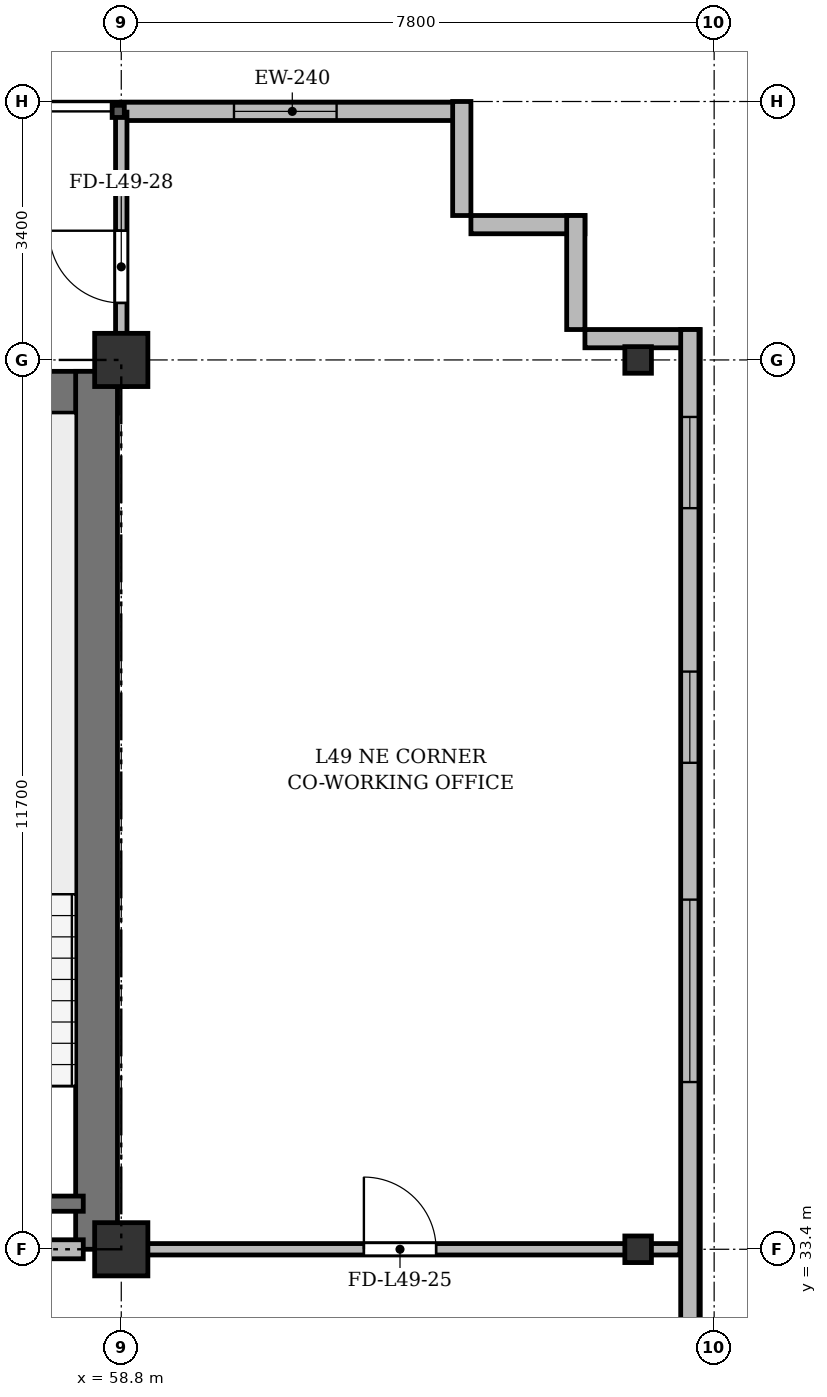
"""IFC4 building model, lengths in metres.
Left out: names, types, materials, properties, quantities, classifications, styles, units other than length and angle.
Written with IfcOpenShell. Run it as: python <this file> out.ifc"""

import sys

from ifc_helpers import new_model, si_unit, direction, frame, frame_2d, origin, origin_2d, place, context, subcontext, project, spatial, rectangle, i_section, extrude, source, transform, mapped, element, fill, save


model = new_model("IFC4")
c1 = context("Model", 3, precision=1e-05, world=origin(), true_north=direction((0.0, 1.0)))
c2 = subcontext(c1, "Body", "Model", "MODEL_VIEW")
j1 = project(units=[si_unit("LENGTHUNIT", "METRE"), si_unit("PLANEANGLEUNIT", "RADIAN")], contexts=[c1])
p1 = place(None, origin())
s1 = spatial("IfcSite", under=j1, at=p1, CompositionType="ELEMENT")
p2 = place(p1, origin())
s2 = spatial("IfcBuilding", under=s1, at=p2, CompositionType="ELEMENT")
p3 = place(p2, frame((0.0, 0.0, 190.5)))
s3 = spatial("IfcBuildingStorey", under=s2, at=p3, CompositionType="ELEMENT", Elevation=190.5)
m1 = source(origin(), c2, "Body", "SweptSolid", [
    extrude(rectangle(XDim=0.7, YDim=0.7, at=origin_2d()), origin(), (0.0, 0.0, 1.0), 3.6),
])
for number, where, z_axis, x_axis in (
    (1, (58.8, 33.4, 0.0), (0.0, 0.0, 1.0), (1.0, 0.0, 0.0)),
    (2, (58.8, 45.1, 0.0), (0.0, 0.0, 1.0), (1.0, 0.0, 0.0)),
):
    element("IfcColumn", number, at=place(p3, frame(where, z_axis=z_axis, x_axis=x_axis)), inside=s3, PredefinedType="COLUMN", context=c2, shape_type="MappedRepresentation", body=[
        mapped(m1, transform((0.0, 0.0, 0.0), x_axis=(1.0, 0.0, 0.0), y_axis=(0.0, 1.0, 0.0), z_axis=(0.0, 0.0, 1.0), scale=1.0)),
    ])
m2 = source(origin(), c2, "Body", "SweptSolid", [
    extrude(i_section(OverallWidth=0.35, OverallDepth=0.35, WebThickness=0.018, FlangeThickness=0.028, at=origin_2d()), origin(), (0.0, 0.0, 1.0), 3.6),
])
for number, where, z_axis, x_axis in (
    (3, (65.6, 33.4, 0.0), (0.0, 0.0, 1.0), (1.0, 0.0, 0.0)),
    (4, (65.6, 45.1, 0.0), (0.0, 0.0, 1.0), (1.0, 0.0, 0.0)),
):
    element("IfcColumn", number, at=place(p3, frame(where, z_axis=z_axis, x_axis=x_axis)), inside=s3, PredefinedType="COLUMN", context=c2, shape_type="MappedRepresentation", body=[
        mapped(m2, transform((0.0, 0.0, 0.0), x_axis=(1.0, 0.0, 0.0), y_axis=(0.0, 1.0, 0.0), z_axis=(0.0, 0.0, 1.0), scale=1.0)),
    ])
p4 = place(p3, frame((58.8, 48.37, 0.0), z_axis=(0.0, 0.0, 1.0), x_axis=(1.0, 0.0, 0.0)))
e5 = element("IfcWall", 5, at=p4, inside=s3, PredefinedType="SOLIDWALL", context=c2, shape_type="SweptSolid", body=[
    extrude(rectangle(XDim=4.5, YDim=0.24, at=frame_2d((2.25, 0.0))), origin(), (0.0, 0.0, 1.0), 3.36),
])
p5 = place(p4, frame((1.483, 0.0, 0.9)))
e6 = element("IfcOpeningElement", 6, at=p5, cuts=e5, PredefinedType="OPENING", context=c2, shape_type="SweptSolid", body=[
    extrude(rectangle(XDim=1.35, YDim=1.5, at=frame_2d((0.675, 0.75))), frame((0.0, 0.13, 0.0), z_axis=(0.0, -1.0, 0.0), x_axis=(1.0, 0.0, 0.0)), (0.0, 0.0, 1.0), 0.26),
])
for number, where, z_axis, x_axis in (
    (7, (63.28, 48.5, 0.0), (0.0, 0.0, 1.0), (0.0, -1.0, 0.0)),
    (8, (63.4, 46.88, 0.0), (0.0, 0.0, 1.0), (1.0, 0.0, 0.0)),
    (9, (64.78, 47.0, 0.0), (0.0, 0.0, 1.0), (0.0, -1.0, 0.0)),
    (10, (64.9, 45.38, 0.0), (0.0, 0.0, 1.0), (1.0, 0.0, 0.0)),
):
    element("IfcWall", number, at=place(p3, frame(where, z_axis=z_axis, x_axis=x_axis)), inside=s3, PredefinedType="SOLIDWALL", context=c2, shape_type="SweptSolid", body=[
        extrude(rectangle(XDim=1.5, YDim=0.24, at=frame_2d((0.75, 0.0))), origin(), (0.0, 0.0, 1.0), 3.36),
    ])
p6 = place(p3, frame((66.28, 45.5, 0.0), z_axis=(0.0, 0.0, 1.0), x_axis=(0.0, -1.0, 0.0)))
e11 = element("IfcWall", 11, at=p6, inside=s3, PredefinedType="SOLIDWALL", context=c2, shape_type="SweptSolid", body=[
    extrude(rectangle(XDim=39.1, YDim=0.24, at=frame_2d((19.55, 0.0))), origin(), (0.0, 0.0, 1.0), 3.36),
])
p7 = place(p6, frame((36.45, 0.0, 0.92)))
e12 = element("IfcOpeningElement", 12, at=p7, cuts=e11, PredefinedType="OPENING", context=c2, shape_type="SweptSolid", body=[
    extrude(rectangle(XDim=1.2, YDim=1.65, at=frame_2d((0.6, 0.825))), frame((0.0, 0.13, 0.0), z_axis=(0.0, -1.0, 0.0), x_axis=(1.0, 0.0, 0.0)), (0.0, 0.0, 1.0), 0.26),
])
p8 = place(p6, frame((32.9, 0.0, 0.92)))
e13 = element("IfcOpeningElement", 13, at=p8, cuts=e11, PredefinedType="OPENING", context=c2, shape_type="SweptSolid", body=[
    extrude(rectangle(XDim=2.4, YDim=2.1, at=frame_2d((1.2, 1.05))), frame((0.0, 0.13, 0.0), z_axis=(0.0, -1.0, 0.0), x_axis=(1.0, 0.0, 0.0)), (0.0, 0.0, 1.0), 0.26),
])
p9 = place(p6, frame((28.7, 0.0, 0.92)))
e14 = element("IfcOpeningElement", 14, at=p9, cuts=e11, PredefinedType="OPENING", context=c2, shape_type="SweptSolid", body=[
    extrude(rectangle(XDim=2.4, YDim=2.1, at=frame_2d((1.2, 1.05))), frame((0.0, 0.13, 0.0), z_axis=(0.0, -1.0, 0.0), x_axis=(1.0, 0.0, 0.0)), (0.0, 0.0, 1.0), 0.26),
])
p10 = place(p6, frame((21.5, 0.0, 0.92)))
e15 = element("IfcOpeningElement", 15, at=p10, cuts=e11, PredefinedType="OPENING", context=c2, shape_type="SweptSolid", body=[
    extrude(rectangle(XDim=2.4, YDim=2.1, at=frame_2d((1.2, 1.05))), frame((0.0, 0.13, 0.0), z_axis=(0.0, -1.0, 0.0), x_axis=(1.0, 0.0, 0.0)), (0.0, 0.0, 1.0), 0.26),
])
p11 = place(p6, frame((7.5, 0.0, 0.92)))
e16 = element("IfcOpeningElement", 16, at=p11, cuts=e11, PredefinedType="OPENING", context=c2, shape_type="SweptSolid", body=[
    extrude(rectangle(XDim=2.4, YDim=2.1, at=frame_2d((1.2, 1.05))), frame((0.0, 0.13, 0.0), z_axis=(0.0, -1.0, 0.0), x_axis=(1.0, 0.0, 0.0)), (0.0, 0.0, 1.0), 0.26),
])
p12 = place(p6, frame((4.5, 0.0, 0.92)))
e17 = element("IfcOpeningElement", 17, at=p12, cuts=e11, PredefinedType="OPENING", context=c2, shape_type="SweptSolid", body=[
    extrude(rectangle(XDim=1.2, YDim=1.65, at=frame_2d((0.6, 0.825))), frame((0.0, 0.13, 0.0), z_axis=(0.0, -1.0, 0.0), x_axis=(1.0, 0.0, 0.0)), (0.0, 0.0, 1.0), 0.26),
])
p13 = place(p6, frame((1.15, 0.0, 0.92)))
e18 = element("IfcOpeningElement", 18, at=p13, cuts=e11, PredefinedType="OPENING", context=c2, shape_type="SweptSolid", body=[
    extrude(rectangle(XDim=1.2, YDim=1.65, at=frame_2d((0.6, 0.825))), frame((0.0, 0.13, 0.0), z_axis=(0.0, -1.0, 0.0), x_axis=(1.0, 0.0, 0.0)), (0.0, 0.0, 1.0), 0.26),
])
p14 = place(p3, frame((15.65, 44.675, 0.0), z_axis=(0.0, 0.0, 1.0), x_axis=(1.0, 0.0, 0.0)))
e19 = element("IfcWall", 19, at=p14, inside=s3, PredefinedType="SHEAR", context=c2, shape_type="SweptSolid", body=[
    extrude(rectangle(XDim=43.1, YDim=0.55, at=frame_2d((21.55, 0.0))), origin(), (0.0, 0.0, 1.0), 3.36),
])
p15 = place(p3, frame((58.475, 33.4, 0.0), z_axis=(0.0, 0.0, 1.0), x_axis=(0.0, 1.0, 0.0)))
e20 = element("IfcWall", 20, at=p15, inside=s3, PredefinedType="SHEAR", context=c2, shape_type="SweptSolid", body=[
    extrude(rectangle(XDim=11.55, YDim=0.55, at=frame_2d((5.775, 0.0))), origin(), (0.0, 0.0, 1.0), 3.36),
])
p16 = place(p3, frame((54.9, 34.0, 0.0), z_axis=(0.0, 0.0, 1.0), x_axis=(1.0, 0.0, 0.0)))
e21 = element("IfcWall", 21, at=p16, inside=s3, PredefinedType="SHEAR", context=c2, shape_type="SweptSolid", body=[
    extrude(rectangle(XDim=3.4, YDim=0.2, at=frame_2d((1.7, 0.0))), origin(), (0.0, 0.0, 1.0), 3.36),
])
p17 = place(p3, frame((47.15, 33.4, 0.0), z_axis=(0.0, 0.0, 1.0), x_axis=(1.0, 0.0, 0.0)))
e22 = element("IfcWall", 22, at=p17, inside=s3, PredefinedType="PARTITIONING", context=c2, shape_type="SweptSolid", body=[
    extrude(rectangle(XDim=11.15, YDim=0.25, at=frame_2d((5.575, 0.0))), origin(), (0.0, 0.0, 1.0), 2.91),
])
p18 = place(p17, frame((0.7, 0.0, 0.0)))
e23 = element("IfcOpeningElement", 23, at=p18, cuts=e22, PredefinedType="OPENING", context=c2, shape_type="SweptSolid", body=[
    extrude(rectangle(XDim=0.95, YDim=2.15, at=frame_2d((0.475, 1.075))), frame((0.0, 0.135, 0.0), z_axis=(0.0, -1.0, 0.0), x_axis=(1.0, 0.0, 0.0)), (0.0, 0.0, 1.0), 0.27),
])
p19 = place(p17, frame((6.0, 0.0, 0.0)))
e24 = element("IfcOpeningElement", 24, at=p19, cuts=e22, PredefinedType="OPENING", context=c2, shape_type="SweptSolid", body=[
    extrude(rectangle(XDim=1.2, YDim=2.15, at=frame_2d((0.6, 1.075))), frame((0.0, 0.135, 0.0), z_axis=(0.0, -1.0, 0.0), x_axis=(1.0, 0.0, 0.0)), (0.0, 0.0, 1.0), 0.27),
])
p20 = place(p3, frame((58.8, 33.4, 0.0), z_axis=(0.0, 0.0, 1.0), x_axis=(1.0, 0.0, 0.0)))
e25 = element("IfcWall", 25, at=p20, inside=s3, PredefinedType="PARTITIONING", context=c2, shape_type="SweptSolid", body=[
    extrude(rectangle(XDim=7.35, YDim=0.15, at=frame_2d((3.675, 0.0))), origin(), (0.0, 0.0, 1.0), 2.91),
])
p21 = place(p20, frame((3.192, 0.0, 0.0)))
e26 = element("IfcOpeningElement", 26, at=p21, cuts=e25, PredefinedType="OPENING", context=c2, shape_type="SweptSolid", body=[
    extrude(rectangle(XDim=0.95, YDim=2.15, at=frame_2d((0.475, 1.075))), frame((0.0, 0.085, 0.0), z_axis=(0.0, -1.0, 0.0), x_axis=(1.0, 0.0, 0.0)), (0.0, 0.0, 1.0), 0.17),
])
p22 = place(p3, frame((58.8, 44.75, 0.0), z_axis=(0.0, 0.0, 1.0), x_axis=(0.0, 1.0, 0.0)))
e27 = element("IfcWall", 27, at=p22, inside=s3, PredefinedType="PARTITIONING", context=c2, shape_type="SweptSolid", body=[
    extrude(rectangle(XDim=3.61, YDim=0.15, at=frame_2d((1.805, 0.0))), origin(), (0.0, 0.0, 1.0), 2.86),
])
p23 = place(p22, frame((1.1, 0.0, 0.0)))
e28 = element("IfcOpeningElement", 28, at=p23, cuts=e27, PredefinedType="OPENING", context=c2, shape_type="SweptSolid", body=[
    extrude(rectangle(XDim=0.95, YDim=2.15, at=frame_2d((0.475, 1.075))), frame((0.0, 0.085, 0.0), z_axis=(0.0, -1.0, 0.0), x_axis=(1.0, 0.0, 0.0)), (0.0, 0.0, 1.0), 0.17),
])
m3 = source(origin(), c2, "Body", "SweptSolid", [
    extrude(rectangle(XDim=1.35, YDim=1.5, at=frame_2d((0.675, 0.75))), frame((0.0, 0.03, 0.0), z_axis=(0.0, -1.0, 0.0), x_axis=(1.0, 0.0, 0.0)), (0.0, 0.0, 1.0), 0.06),
])
p24 = place(p5, origin())
e29 = element("IfcWindow", 29, at=p24, inside=s3, PartitioningType="SINGLE_PANEL", PredefinedType="WINDOW", context=c2, shape_type="MappedRepresentation", body=[
    mapped(m3, transform((0.0, 0.0, 0.0), x_axis=(1.0, 0.0, 0.0), y_axis=(0.0, 1.0, 0.0), z_axis=(0.0, 0.0, 1.0), scale=1.0)),
])
fill(e6, e29)
m4 = source(origin(), c2, "Body", "SweptSolid", [
    extrude(rectangle(XDim=2.4, YDim=2.1, at=frame_2d((1.2, 1.05))), frame((0.0, 0.03, 0.0), z_axis=(0.0, -1.0, 0.0), x_axis=(1.0, 0.0, 0.0)), (0.0, 0.0, 1.0), 0.06),
])
p25 = place(p11, origin())
e30 = element("IfcWindow", 30, at=p25, inside=s3, PartitioningType="SINGLE_PANEL", PredefinedType="WINDOW", context=c2, shape_type="MappedRepresentation", body=[
    mapped(m4, transform((0.0, 0.0, 0.0), x_axis=(1.0, 0.0, 0.0), y_axis=(0.0, 1.0, 0.0), z_axis=(0.0, 0.0, 1.0), scale=1.0)),
])
fill(e16, e30)
m5 = source(origin(), c2, "Body", "SweptSolid", [
    extrude(rectangle(XDim=1.2, YDim=1.65, at=frame_2d((0.6, 0.825))), frame((0.0, 0.03, 0.0), z_axis=(0.0, -1.0, 0.0), x_axis=(1.0, 0.0, 0.0)), (0.0, 0.0, 1.0), 0.06),
])
p26 = place(p12, origin())
e31 = element("IfcWindow", 31, at=p26, inside=s3, PartitioningType="SINGLE_PANEL", PredefinedType="WINDOW", context=c2, shape_type="MappedRepresentation", body=[
    mapped(m5, transform((0.0, 0.0, 0.0), x_axis=(1.0, 0.0, 0.0), y_axis=(0.0, 1.0, 0.0), z_axis=(0.0, 0.0, 1.0), scale=1.0)),
])
fill(e17, e31)
p27 = place(p13, origin())
e32 = element("IfcWindow", 32, at=p27, inside=s3, PartitioningType="SINGLE_PANEL", PredefinedType="WINDOW", context=c2, shape_type="MappedRepresentation", body=[
    mapped(m5, transform((0.0, 0.0, 0.0), x_axis=(1.0, 0.0, 0.0), y_axis=(0.0, 1.0, 0.0), z_axis=(0.0, 0.0, 1.0), scale=1.0)),
])
fill(e18, e32)
m6 = source(origin(), c2, "Body", "SweptSolid", [
    extrude(rectangle(XDim=0.95, YDim=2.15, at=frame_2d((0.475, 1.075))), frame((0.0, 0.025, 0.0), z_axis=(0.0, -1.0, 0.0), x_axis=(1.0, 0.0, 0.0)), (0.0, 0.0, 1.0), 0.05),
])
p28 = place(p21, origin())
e33 = element("IfcDoor", 33, at=p28, inside=s3, OperationType="SINGLE_SWING_LEFT", PredefinedType="DOOR", context=c2, shape_type="MappedRepresentation", body=[
    mapped(m6, transform((0.0, 0.0, 0.0), x_axis=(1.0, 0.0, 0.0), y_axis=(0.0, 1.0, 0.0), z_axis=(0.0, 0.0, 1.0), scale=1.0)),
])
fill(e26, e33)
p29 = place(p23, origin())
e34 = element("IfcDoor", 34, at=p29, inside=s3, OperationType="SINGLE_SWING_RIGHT", PredefinedType="DOOR", context=c2, shape_type="MappedRepresentation", body=[
    mapped(m6, transform((0.0, 0.0, 0.0), x_axis=(1.0, 0.0, 0.0), y_axis=(0.0, 1.0, 0.0), z_axis=(0.0, 0.0, 1.0), scale=1.0)),
])
fill(e28, e34)
save(model, sys.argv[1])
